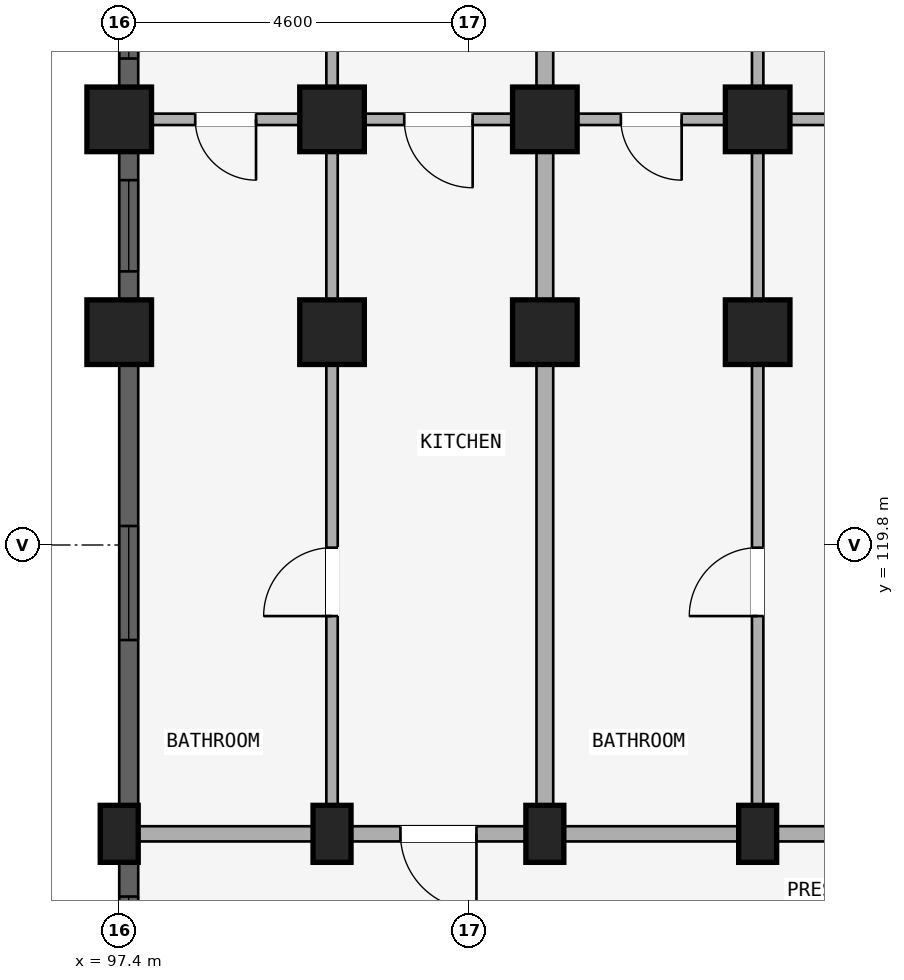
"""IFC4 building model, lengths in metres.
Left out: names, types, materials, properties, quantities, classifications, styles, units other than length and angle.
Written with IfcOpenShell. Run it as: python <this file> out.ifc"""

import sys

from ifc_helpers import new_model, si_unit, direction, frame, frame_2d, origin, origin_2d, place, context, subcontext, project, spatial, rectangle, extrude, element, fill, save


model = new_model("IFC4")
c1 = context("Model", 3, precision=1e-05, world=origin(), true_north=direction((0.0, 1.0)))
c2 = subcontext(c1, "Body", "Model", "MODEL_VIEW")
j1 = project(units=[si_unit("LENGTHUNIT", "METRE"), si_unit("PLANEANGLEUNIT", "RADIAN")], contexts=[c1])
p1 = place(None, origin())
s1 = spatial("IfcSite", under=j1, at=p1, CompositionType="ELEMENT")
p2 = place(p1, origin())
s2 = spatial("IfcBuilding", under=s1, at=p2, CompositionType="ELEMENT")
p3 = place(p2, frame((0.0, 0.0, 4.5)))
s3 = spatial("IfcBuildingStorey", under=s2, at=p3, CompositionType="ELEMENT", Elevation=4.5)
p4 = place(p3, frame((105.8, 116.0, 0.0), z_axis=(0.0, 0.0, 1.0), x_axis=(1.0, 0.0, 0.0)))
e1 = element("IfcColumn", 1, at=p4, inside=s3, PredefinedType="COLUMN", context=c2, shape_type="SweptSolid", body=[
    extrude(rectangle(XDim=0.5, YDim=0.75, at=origin_2d()), origin(), (0.0, 0.0, 1.0), 3.98),
])
for number, where, z_axis, x_axis in (
    (2, (105.8, 122.6, 0.0), (0.0, 0.0, 1.0), (1.0, 0.0, 0.0)),
    (3, (105.8, 125.4, 0.0), (0.0, 0.0, 1.0), (1.0, 0.0, 0.0)),
):
    element("IfcColumn", number, at=place(p3, frame(where, z_axis=z_axis, x_axis=x_axis)), inside=s3, PredefinedType="COLUMN", context=c2, shape_type="SweptSolid", body=[
        extrude(rectangle(XDim=0.85, YDim=0.85, at=origin_2d()), origin(), (0.0, 0.0, 1.0), 3.98),
    ])
p5 = place(p3, frame((103.0, 116.0, 0.0), z_axis=(0.0, 0.0, 1.0), x_axis=(1.0, 0.0, 0.0)))
e4 = element("IfcColumn", 4, at=p5, inside=s3, PredefinedType="COLUMN", context=c2, shape_type="SweptSolid", body=[
    extrude(rectangle(XDim=0.5, YDim=0.75, at=origin_2d()), origin(), (0.0, 0.0, 1.0), 3.98),
])
for number, where, z_axis, x_axis in (
    (5, (103.0, 122.6, 0.0), (0.0, 0.0, 1.0), (1.0, 0.0, 0.0)),
    (6, (103.0, 125.4, 0.0), (0.0, 0.0, 1.0), (1.0, 0.0, 0.0)),
):
    element("IfcColumn", number, at=place(p3, frame(where, z_axis=z_axis, x_axis=x_axis)), inside=s3, PredefinedType="COLUMN", context=c2, shape_type="SweptSolid", body=[
        extrude(rectangle(XDim=0.85, YDim=0.85, at=origin_2d()), origin(), (0.0, 0.0, 1.0), 3.98),
    ])
p6 = place(p3, frame((100.2, 116.0, 0.0), z_axis=(0.0, 0.0, 1.0), x_axis=(1.0, 0.0, 0.0)))
e7 = element("IfcColumn", 7, at=p6, inside=s3, PredefinedType="COLUMN", context=c2, shape_type="SweptSolid", body=[
    extrude(rectangle(XDim=0.5, YDim=0.75, at=origin_2d()), origin(), (0.0, 0.0, 1.0), 3.98),
])
for number, where, z_axis, x_axis in (
    (8, (100.2, 122.6, 0.0), (0.0, 0.0, 1.0), (1.0, 0.0, 0.0)),
    (9, (100.2, 125.4, 0.0), (0.0, 0.0, 1.0), (1.0, 0.0, 0.0)),
):
    element("IfcColumn", number, at=place(p3, frame(where, z_axis=z_axis, x_axis=x_axis)), inside=s3, PredefinedType="COLUMN", context=c2, shape_type="SweptSolid", body=[
        extrude(rectangle(XDim=0.85, YDim=0.85, at=origin_2d()), origin(), (0.0, 0.0, 1.0), 3.98),
    ])
p7 = place(p3, frame((97.4, 116.0, 0.0), z_axis=(0.0, 0.0, 1.0), x_axis=(1.0, 0.0, 0.0)))
e10 = element("IfcColumn", 10, at=p7, inside=s3, PredefinedType="COLUMN", context=c2, shape_type="SweptSolid", body=[
    extrude(rectangle(XDim=0.5, YDim=0.75, at=origin_2d()), origin(), (0.0, 0.0, 1.0), 3.98),
])
for number, where, z_axis, x_axis in (
    (11, (97.4, 122.6, 0.0), (0.0, 0.0, 1.0), (1.0, 0.0, 0.0)),
    (12, (97.4, 125.4, 0.0), (0.0, 0.0, 1.0), (1.0, 0.0, 0.0)),
):
    element("IfcColumn", number, at=place(p3, frame(where, z_axis=z_axis, x_axis=x_axis)), inside=s3, PredefinedType="COLUMN", context=c2, shape_type="SweptSolid", body=[
        extrude(rectangle(XDim=0.85, YDim=0.85, at=origin_2d()), origin(), (0.0, 0.0, 1.0), 3.98),
    ])
p8 = place(p3, frame((108.6, 116.0, 0.0), z_axis=(0.0, 0.0, 1.0), x_axis=(-1.0, 0.0, 0.0)))
e13 = element("IfcWall", 13, at=p8, inside=s3, PredefinedType="STANDARD", context=c2, shape_type="SweptSolid", body=[
    extrude(rectangle(XDim=2.8, YDim=0.2, at=frame_2d((1.4, 0.0))), origin(), (0.0, 0.0, 1.0), 3.322),
])
p9 = place(p8, frame((0.9, 0.0, 0.0)))
e14 = element("IfcOpeningElement", 14, at=p9, cuts=e13, PredefinedType="OPENING", context=c2, shape_type="SweptSolid", body=[
    extrude(rectangle(XDim=1.0, YDim=2.15, at=frame_2d((0.5, 1.075))), frame((0.0, 0.11, 0.0), z_axis=(0.0, -1.0, 0.0), x_axis=(1.0, 0.0, 0.0)), (0.0, 0.0, 1.0), 0.22),
])
p10 = place(p3, frame((108.52, 125.4, 0.0), z_axis=(0.0, 0.0, 1.0), x_axis=(-1.0, 0.0, 0.0)))
e15 = element("IfcWall", 15, at=p10, inside=s3, PredefinedType="PLUMBINGWALL", context=c2, shape_type="SweptSolid", body=[
    extrude(rectangle(XDim=2.64, YDim=0.15, at=frame_2d((1.32, 0.0))), origin(), (0.0, 0.0, 1.0), 3.322),
])
p11 = place(p10, frame((0.87, 0.0, 0.0)))
e16 = element("IfcOpeningElement", 16, at=p11, cuts=e15, PredefinedType="OPENING", context=c2, shape_type="SweptSolid", body=[
    extrude(rectangle(XDim=0.9, YDim=2.1, at=frame_2d((0.45, 1.05))), frame((0.0, 0.085, 0.0), z_axis=(0.0, -1.0, 0.0), x_axis=(1.0, 0.0, 0.0)), (0.0, 0.0, 1.0), 0.17),
])
p12 = place(p3, frame((105.8, 116.0, 0.0), z_axis=(0.0, 0.0, 1.0), x_axis=(-1.0, 0.0, 0.0)))
e17 = element("IfcWall", 17, at=p12, inside=s3, PredefinedType="STANDARD", context=c2, shape_type="SweptSolid", body=[
    extrude(rectangle(XDim=2.8, YDim=0.2, at=frame_2d((1.4, 0.0))), origin(), (0.0, 0.0, 1.0), 3.322),
])
p13 = place(p3, frame((105.72, 125.4, 0.0), z_axis=(0.0, 0.0, 1.0), x_axis=(-1.0, 0.0, 0.0)))
e18 = element("IfcWall", 18, at=p13, inside=s3, PredefinedType="PLUMBINGWALL", context=c2, shape_type="SweptSolid", body=[
    extrude(rectangle(XDim=2.64, YDim=0.15, at=frame_2d((1.32, 0.0))), origin(), (0.0, 0.0, 1.0), 3.322),
])
p14 = place(p13, frame((0.92, 0.0, 0.0)))
e19 = element("IfcOpeningElement", 19, at=p14, cuts=e18, PredefinedType="OPENING", context=c2, shape_type="SweptSolid", body=[
    extrude(rectangle(XDim=0.8, YDim=2.1, at=frame_2d((0.4, 1.05))), frame((0.0, 0.085, 0.0), z_axis=(0.0, -1.0, 0.0), x_axis=(1.0, 0.0, 0.0)), (0.0, 0.0, 1.0), 0.17),
])
p15 = place(p3, frame((103.0, 116.0, 0.0), z_axis=(0.0, 0.0, 1.0), x_axis=(-1.0, 0.0, 0.0)))
e20 = element("IfcWall", 20, at=p15, inside=s3, PredefinedType="STANDARD", context=c2, shape_type="SweptSolid", body=[
    extrude(rectangle(XDim=2.8, YDim=0.2, at=frame_2d((1.4, 0.0))), origin(), (0.0, 0.0, 1.0), 3.322),
])
p16 = place(p15, frame((0.9, 0.0, 0.0)))
e21 = element("IfcOpeningElement", 21, at=p16, cuts=e20, PredefinedType="OPENING", context=c2, shape_type="SweptSolid", body=[
    extrude(rectangle(XDim=1.0, YDim=2.15, at=frame_2d((0.5, 1.075))), frame((0.0, 0.11, 0.0), z_axis=(0.0, -1.0, 0.0), x_axis=(1.0, 0.0, 0.0)), (0.0, 0.0, 1.0), 0.22),
])
p17 = place(p3, frame((102.92, 125.4, 0.0), z_axis=(0.0, 0.0, 1.0), x_axis=(-1.0, 0.0, 0.0)))
e22 = element("IfcWall", 22, at=p17, inside=s3, PredefinedType="PLUMBINGWALL", context=c2, shape_type="SweptSolid", body=[
    extrude(rectangle(XDim=2.64, YDim=0.15, at=frame_2d((1.32, 0.0))), origin(), (0.0, 0.0, 1.0), 3.322),
])
p18 = place(p17, frame((0.87, 0.0, 0.0)))
e23 = element("IfcOpeningElement", 23, at=p18, cuts=e22, PredefinedType="OPENING", context=c2, shape_type="SweptSolid", body=[
    extrude(rectangle(XDim=0.9, YDim=2.1, at=frame_2d((0.45, 1.05))), frame((0.0, 0.085, 0.0), z_axis=(0.0, -1.0, 0.0), x_axis=(1.0, 0.0, 0.0)), (0.0, 0.0, 1.0), 0.17),
])
p19 = place(p3, frame((100.2, 116.0, 0.0), z_axis=(0.0, 0.0, 1.0), x_axis=(-1.0, 0.0, 0.0)))
e24 = element("IfcWall", 24, at=p19, inside=s3, PredefinedType="STANDARD", context=c2, shape_type="SweptSolid", body=[
    extrude(rectangle(XDim=2.8, YDim=0.2, at=frame_2d((1.4, 0.0))), origin(), (0.0, 0.0, 1.0), 3.322),
])
p20 = place(p3, frame((100.12, 125.4, 0.0), z_axis=(0.0, 0.0, 1.0), x_axis=(-1.0, 0.0, 0.0)))
e25 = element("IfcWall", 25, at=p20, inside=s3, PredefinedType="PLUMBINGWALL", context=c2, shape_type="SweptSolid", body=[
    extrude(rectangle(XDim=2.64, YDim=0.15, at=frame_2d((1.32, 0.0))), origin(), (0.0, 0.0, 1.0), 3.322),
])
p21 = place(p20, frame((0.92, 0.0, 0.0)))
e26 = element("IfcOpeningElement", 26, at=p21, cuts=e25, PredefinedType="OPENING", context=c2, shape_type="SweptSolid", body=[
    extrude(rectangle(XDim=0.8, YDim=2.1, at=frame_2d((0.4, 1.05))), frame((0.0, 0.085, 0.0), z_axis=(0.0, -1.0, 0.0), x_axis=(1.0, 0.0, 0.0)), (0.0, 0.0, 1.0), 0.17),
])
p22 = place(p3, frame((105.8, 116.05, 0.0), z_axis=(0.0, 0.0, 1.0), x_axis=(0.0, 1.0, 0.0)))
e27 = element("IfcWall", 27, at=p22, inside=s3, PredefinedType="PARTITIONING", context=c2, shape_type="SweptSolid", body=[
    extrude(rectangle(XDim=6.53, YDim=0.15, at=frame_2d((3.265, 0.0))), origin(), (0.0, 0.0, 1.0), 3.322),
])
p23 = place(p22, frame((2.815, 0.0, 0.0)))
e28 = element("IfcOpeningElement", 28, at=p23, cuts=e27, PredefinedType="OPENING", context=c2, shape_type="SweptSolid", body=[
    extrude(rectangle(XDim=0.9, YDim=2.1, at=frame_2d((0.45, 1.05))), frame((0.0, 0.085, 0.0), z_axis=(0.0, -1.0, 0.0), x_axis=(1.0, 0.0, 0.0)), (0.0, 0.0, 1.0), 0.17),
])
p24 = place(p3, frame((105.8, 122.7, 0.0), z_axis=(0.0, 0.0, 1.0), x_axis=(0.0, 1.0, 0.0)))
e29 = element("IfcWall", 29, at=p24, inside=s3, PredefinedType="PARTITIONING", context=c2, shape_type="SweptSolid", body=[
    extrude(rectangle(XDim=10.82, YDim=0.15, at=frame_2d((5.41, 0.0))), origin(), (0.0, 0.0, 1.0), 3.322),
])
p25 = place(p24, frame((3.7, 0.0, 0.0)))
e30 = element("IfcOpeningElement", 30, at=p25, cuts=e29, PredefinedType="OPENING", context=c2, shape_type="SweptSolid", body=[
    extrude(rectangle(XDim=0.8, YDim=2.1, at=frame_2d((0.4, 1.05))), frame((0.0, 0.085, 0.0), z_axis=(0.0, -1.0, 0.0), x_axis=(1.0, 0.0, 0.0)), (0.0, 0.0, 1.0), 0.17),
])
p26 = place(p3, frame((103.0, 116.05, 0.0), z_axis=(0.0, 0.0, 1.0), x_axis=(0.0, 1.0, 0.0)))
e31 = element("IfcWall", 31, at=p26, inside=s3, PredefinedType="STANDARD", context=c2, shape_type="SweptSolid", body=[
    extrude(rectangle(XDim=6.53, YDim=0.22, at=frame_2d((3.265, 0.0))), origin(), (0.0, 0.0, 1.0), 3.322),
])
p27 = place(p3, frame((103.0, 122.7, 0.0), z_axis=(0.0, 0.0, 1.0), x_axis=(0.0, 1.0, 0.0)))
e32 = element("IfcWall", 32, at=p27, inside=s3, PredefinedType="STANDARD", context=c2, shape_type="SweptSolid", body=[
    extrude(rectangle(XDim=10.82, YDim=0.22, at=frame_2d((5.41, 0.0))), origin(), (0.0, 0.0, 1.0), 3.322),
])
p28 = place(p3, frame((100.2, 116.05, 0.0), z_axis=(0.0, 0.0, 1.0), x_axis=(0.0, 1.0, 0.0)))
e33 = element("IfcWall", 33, at=p28, inside=s3, PredefinedType="PARTITIONING", context=c2, shape_type="SweptSolid", body=[
    extrude(rectangle(XDim=6.53, YDim=0.15, at=frame_2d((3.265, 0.0))), origin(), (0.0, 0.0, 1.0), 3.322),
])
p29 = place(p28, frame((2.815, 0.0, 0.0)))
e34 = element("IfcOpeningElement", 34, at=p29, cuts=e33, PredefinedType="OPENING", context=c2, shape_type="SweptSolid", body=[
    extrude(rectangle(XDim=0.9, YDim=2.1, at=frame_2d((0.45, 1.05))), frame((0.0, 0.085, 0.0), z_axis=(0.0, -1.0, 0.0), x_axis=(1.0, 0.0, 0.0)), (0.0, 0.0, 1.0), 0.17),
])
p30 = place(p3, frame((100.2, 122.7, 0.0), z_axis=(0.0, 0.0, 1.0), x_axis=(0.0, 1.0, 0.0)))
e35 = element("IfcWall", 35, at=p30, inside=s3, PredefinedType="PARTITIONING", context=c2, shape_type="SweptSolid", body=[
    extrude(rectangle(XDim=10.82, YDim=0.15, at=frame_2d((5.41, 0.0))), origin(), (0.0, 0.0, 1.0), 3.322),
])
p31 = place(p30, frame((3.7, 0.0, 0.0)))
e36 = element("IfcOpeningElement", 36, at=p31, cuts=e35, PredefinedType="OPENING", context=c2, shape_type="SweptSolid", body=[
    extrude(rectangle(XDim=0.8, YDim=2.1, at=frame_2d((0.4, 1.05))), frame((0.0, 0.085, 0.0), z_axis=(0.0, -1.0, 0.0), x_axis=(1.0, 0.0, 0.0)), (0.0, 0.0, 1.0), 0.17),
])
p32 = place(p3, frame((97.525, 113.979, 0.0), z_axis=(0.0, 0.0, 1.0), x_axis=(0.0, 1.0, 0.0)))
e37 = element("IfcWall", 37, at=p32, inside=s3, PredefinedType="STANDARD", context=c2, shape_type="SweptSolid", body=[
    extrude(rectangle(XDim=1.643, YDim=0.25, at=frame_2d((0.822, 0.0))), origin(), (0.0, 0.0, 1.0), 3.322),
])
p33 = place(p32, frame((0.447, 0.0, 0.88)))
e38 = element("IfcOpeningElement", 38, at=p33, cuts=e37, PredefinedType="OPENING", context=c2, shape_type="SweptSolid", body=[
    extrude(rectangle(XDim=0.75, YDim=1.05, at=frame_2d((0.375, 0.525))), frame((0.0, 0.135, 0.0), z_axis=(0.0, -1.0, 0.0), x_axis=(1.0, 0.0, 0.0)), (0.0, 0.0, 1.0), 0.27),
])
p34 = place(p3, frame((97.525, 116.378, 0.0), z_axis=(0.0, 0.0, 1.0), x_axis=(0.0, 1.0, 0.0)))
e39 = element("IfcWall", 39, at=p34, inside=s3, PredefinedType="STANDARD", context=c2, shape_type="SweptSolid", body=[
    extrude(rectangle(XDim=5.802, YDim=0.25, at=frame_2d((2.901, 0.0))), origin(), (0.0, 0.0, 1.0), 3.322),
])
p35 = place(p34, frame((2.171, 0.0, 0.88)))
e40 = element("IfcOpeningElement", 40, at=p35, cuts=e39, PredefinedType="OPENING", context=c2, shape_type="SweptSolid", body=[
    extrude(rectangle(XDim=1.5, YDim=1.65, at=frame_2d((0.75, 0.825))), frame((0.0, 0.135, 0.0), z_axis=(0.0, -1.0, 0.0), x_axis=(1.0, 0.0, 0.0)), (0.0, 0.0, 1.0), 0.27),
])
p36 = place(p3, frame((97.525, 123.02, 0.0), z_axis=(0.0, 0.0, 1.0), x_axis=(0.0, 1.0, 0.0)))
e41 = element("IfcWall", 41, at=p36, inside=s3, PredefinedType="STANDARD", context=c2, shape_type="SweptSolid", body=[
    extrude(rectangle(XDim=1.96, YDim=0.25, at=frame_2d((0.98, 0.0))), origin(), (0.0, 0.0, 1.0), 3.322),
])
p37 = place(p36, frame((0.38, 0.0, 0.88)))
e42 = element("IfcOpeningElement", 42, at=p37, cuts=e41, PredefinedType="OPENING", context=c2, shape_type="SweptSolid", body=[
    extrude(rectangle(XDim=1.2, YDim=1.5, at=frame_2d((0.6, 0.75))), frame((0.0, 0.135, 0.0), z_axis=(0.0, -1.0, 0.0), x_axis=(1.0, 0.0, 0.0)), (0.0, 0.0, 1.0), 0.27),
])
p38 = place(p3, frame((97.525, 125.82, 0.0), z_axis=(0.0, 0.0, 1.0), x_axis=(0.0, 1.0, 0.0)))
e43 = element("IfcWall", 43, at=p38, inside=s3, PredefinedType="STANDARD", context=c2, shape_type="SweptSolid", body=[
    extrude(rectangle(XDim=1.96, YDim=0.25, at=frame_2d((0.98, 0.0))), origin(), (0.0, 0.0, 1.0), 3.322),
])
p39 = place(p38, frame((0.38, 0.0, 0.88)))
e44 = element("IfcOpeningElement", 44, at=p39, cuts=e43, PredefinedType="OPENING", context=c2, shape_type="SweptSolid", body=[
    extrude(rectangle(XDim=1.2, YDim=1.5, at=frame_2d((0.6, 0.75))), frame((0.0, 0.135, 0.0), z_axis=(0.0, -1.0, 0.0), x_axis=(1.0, 0.0, 0.0)), (0.0, 0.0, 1.0), 0.27),
])
p40 = place(p33, origin())
e45 = element("IfcWindow", 45, at=p40, inside=s3, PartitioningType="SINGLE_PANEL", PredefinedType="WINDOW", context=c2, shape_type="SweptSolid", body=[
    extrude(rectangle(XDim=0.75, YDim=1.05, at=frame_2d((0.375, 0.525))), frame((0.0, 0.03, 0.0), z_axis=(0.0, -1.0, 0.0), x_axis=(1.0, 0.0, 0.0)), (0.0, 0.0, 1.0), 0.06),
])
fill(e38, e45)
p41 = place(p35, origin())
e46 = element("IfcWindow", 46, at=p41, inside=s3, PartitioningType="DOUBLE_PANEL_VERTICAL", PredefinedType="WINDOW", context=c2, shape_type="SweptSolid", body=[
    extrude(rectangle(XDim=1.5, YDim=1.65, at=frame_2d((0.75, 0.825))), frame((0.0, 0.03, 0.0), z_axis=(0.0, -1.0, 0.0), x_axis=(1.0, 0.0, 0.0)), (0.0, 0.0, 1.0), 0.06),
])
fill(e40, e46)
p42 = place(p37, origin())
e47 = element("IfcWindow", 47, at=p42, inside=s3, PartitioningType="SINGLE_PANEL", PredefinedType="WINDOW", context=c2, shape_type="SweptSolid", body=[
    extrude(rectangle(XDim=1.2, YDim=1.5, at=frame_2d((0.6, 0.75))), frame((0.0, 0.03, 0.0), z_axis=(0.0, -1.0, 0.0), x_axis=(1.0, 0.0, 0.0)), (0.0, 0.0, 1.0), 0.06),
])
fill(e42, e47)
p43 = place(p39, origin())
e48 = element("IfcWindow", 48, at=p43, inside=s3, PartitioningType="SINGLE_PANEL", PredefinedType="WINDOW", context=c2, shape_type="SweptSolid", body=[
    extrude(rectangle(XDim=1.2, YDim=1.5, at=frame_2d((0.6, 0.75))), frame((0.0, 0.03, 0.0), z_axis=(0.0, -1.0, 0.0), x_axis=(1.0, 0.0, 0.0)), (0.0, 0.0, 1.0), 0.06),
])
fill(e44, e48)
p44 = place(p14, origin())
e49 = element("IfcDoor", 49, at=p44, inside=s3, OperationType="SINGLE_SWING_LEFT", PredefinedType="DOOR", context=c2, shape_type="SweptSolid", body=[
    extrude(rectangle(XDim=0.8, YDim=2.1, at=frame_2d((0.4, 1.05))), frame((0.0, 0.025, 0.0), z_axis=(0.0, -1.0, 0.0), x_axis=(1.0, 0.0, 0.0)), (0.0, 0.0, 1.0), 0.05),
])
fill(e19, e49)
p45 = place(p18, origin())
e50 = element("IfcDoor", 50, at=p45, inside=s3, OperationType="SINGLE_SWING_LEFT", PredefinedType="DOOR", context=c2, shape_type="SweptSolid", body=[
    extrude(rectangle(XDim=0.9, YDim=2.1, at=frame_2d((0.45, 1.05))), frame((0.0, 0.025, 0.0), z_axis=(0.0, -1.0, 0.0), x_axis=(1.0, 0.0, 0.0)), (0.0, 0.0, 1.0), 0.05),
])
fill(e23, e50)
p46 = place(p16, frame((1.0, 0.0, 0.0), z_axis=(0.0, 0.0, 1.0), x_axis=(-1.0, 0.0, 0.0)))
e51 = element("IfcDoor", 51, at=p46, inside=s3, OperationType="SINGLE_SWING_RIGHT", PredefinedType="DOOR", context=c2, shape_type="SweptSolid", body=[
    extrude(rectangle(XDim=1.0, YDim=2.15, at=frame_2d((0.5, 1.075))), frame((0.0, 0.025, 0.0), z_axis=(0.0, -1.0, 0.0), x_axis=(1.0, 0.0, 0.0)), (0.0, 0.0, 1.0), 0.05),
])
fill(e21, e51)
p47 = place(p21, origin())
e52 = element("IfcDoor", 52, at=p47, inside=s3, OperationType="SINGLE_SWING_LEFT", PredefinedType="DOOR", context=c2, shape_type="SweptSolid", body=[
    extrude(rectangle(XDim=0.8, YDim=2.1, at=frame_2d((0.4, 1.05))), frame((0.0, 0.025, 0.0), z_axis=(0.0, -1.0, 0.0), x_axis=(1.0, 0.0, 0.0)), (0.0, 0.0, 1.0), 0.05),
])
fill(e26, e52)
p48 = place(p23, frame((0.9, 0.0, 0.0), z_axis=(0.0, 0.0, 1.0), x_axis=(-1.0, 0.0, 0.0)))
e53 = element("IfcDoor", 53, at=p48, inside=s3, OperationType="SINGLE_SWING_RIGHT", PredefinedType="DOOR", context=c2, shape_type="SweptSolid", body=[
    extrude(rectangle(XDim=0.9, YDim=2.1, at=frame_2d((0.45, 1.05))), frame((0.0, 0.025, 0.0), z_axis=(0.0, -1.0, 0.0), x_axis=(1.0, 0.0, 0.0)), (0.0, 0.0, 1.0), 0.05),
])
fill(e28, e53)
p49 = place(p29, origin())
e54 = element("IfcDoor", 54, at=p49, inside=s3, OperationType="SINGLE_SWING_LEFT", PredefinedType="DOOR", context=c2, shape_type="SweptSolid", body=[
    extrude(rectangle(XDim=0.9, YDim=2.1, at=frame_2d((0.45, 1.05))), frame((0.0, 0.025, 0.0), z_axis=(0.0, -1.0, 0.0), x_axis=(1.0, 0.0, 0.0)), (0.0, 0.0, 1.0), 0.05),
])
fill(e34, e54)
save(model, sys.argv[1])
